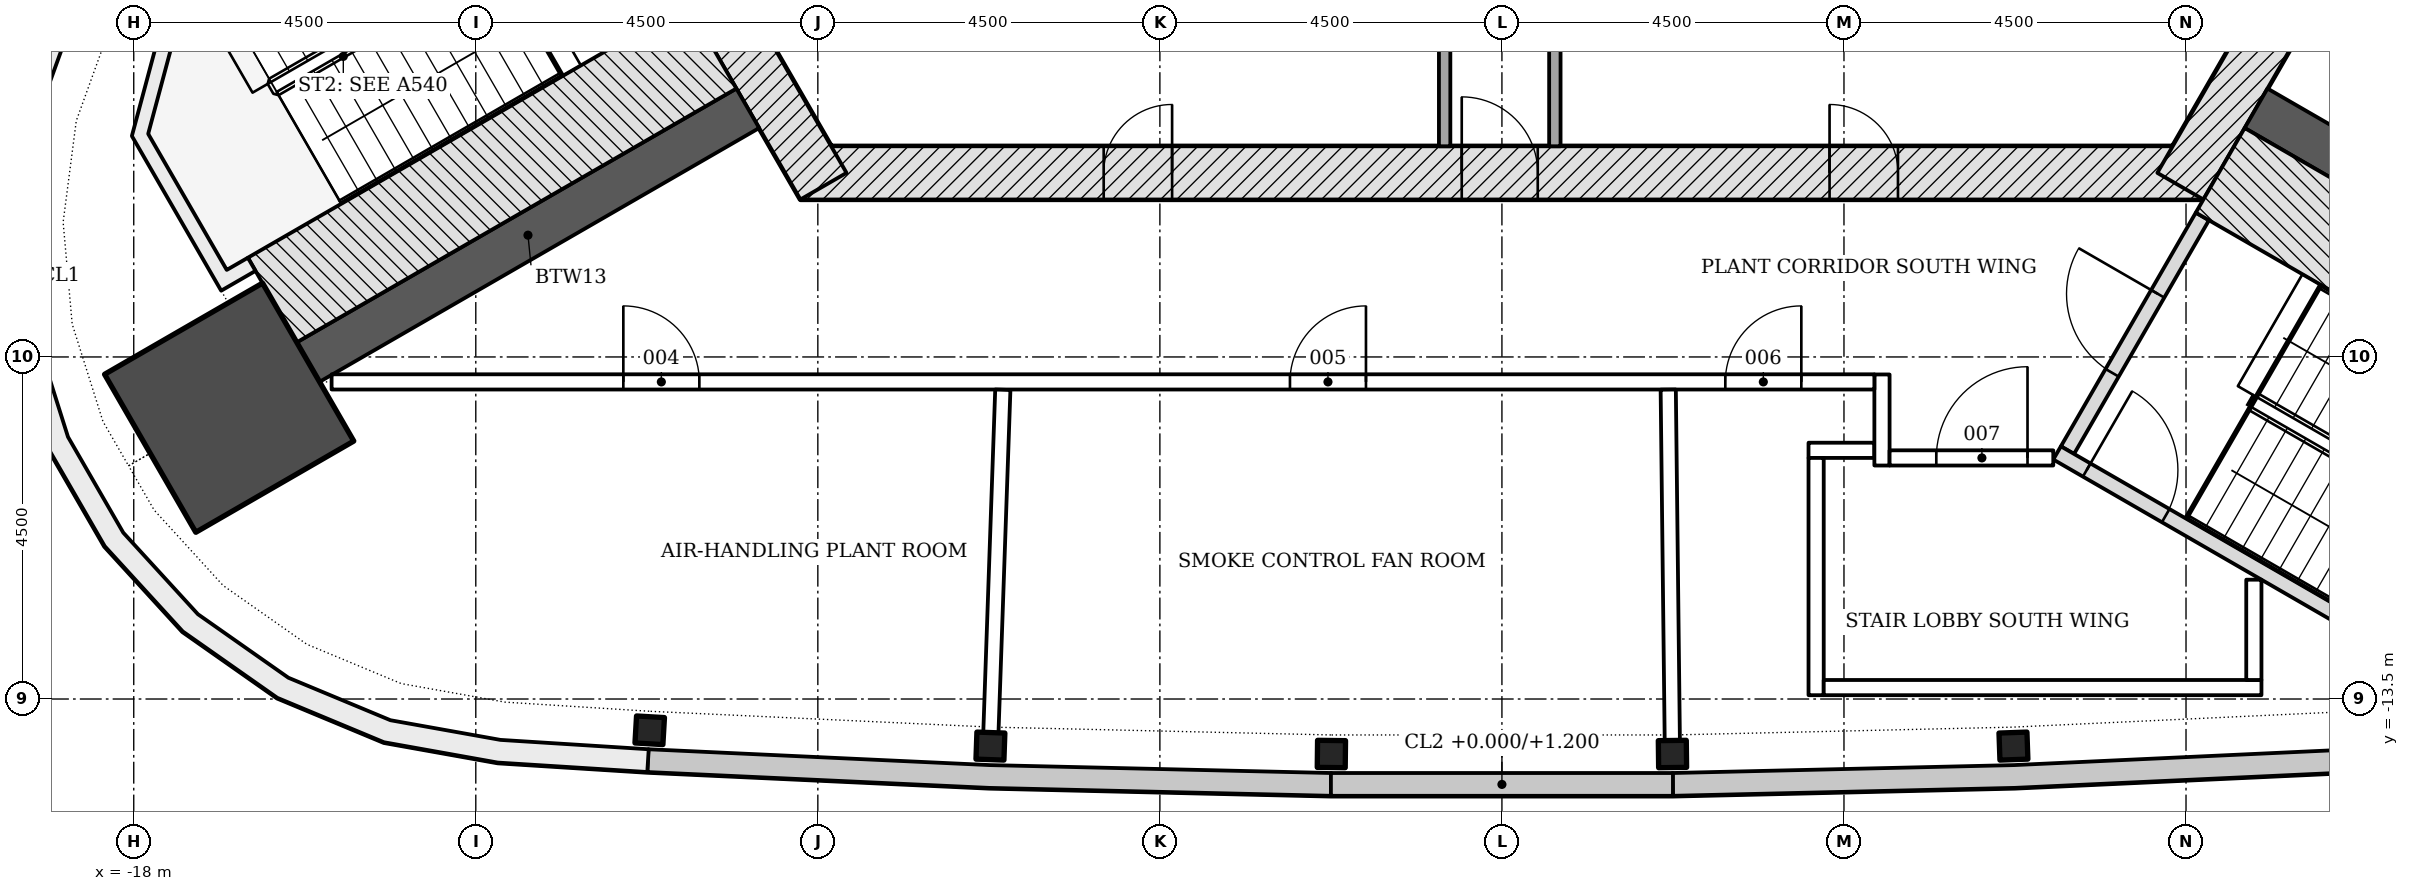
"""IFC4 building model, lengths in metres.
Left out: names, types, materials, properties, quantities, classifications, styles, units other than length and angle.
Written with IfcOpenShell. Run it as: python <this file> out.ifc"""

import sys

from ifc_helpers import new_model, si_unit, direction, frame, frame_2d, origin, origin_2d, place, context, subcontext, project, spatial, polyline, rectangle, i_section, outline, extrude, element, fill, save


model = new_model("IFC4")
c1 = context("Model", 3, precision=1e-05, world=origin(), true_north=direction((0.0, 1.0)))
c2 = subcontext(c1, "Body", "Model", "MODEL_VIEW")
j1 = project(units=[si_unit("LENGTHUNIT", "METRE"), si_unit("PLANEANGLEUNIT", "RADIAN")], contexts=[c1])
p1 = place(None, origin())
s1 = spatial("IfcSite", under=j1, at=p1, CompositionType="ELEMENT")
p2 = place(p1, origin())
s2 = spatial("IfcBuilding", under=s1, at=p2, CompositionType="ELEMENT")
p3 = place(p2, frame((0.0, 0.0, 288.6)))
s3 = spatial("IfcBuildingStorey", under=s2, at=p3, CompositionType="ELEMENT", Elevation=288.6)
p4 = place(p3, frame((-9.229, -6.578, -0.25), z_axis=(0.0, 0.0, 1.0), x_axis=(1.0, 0.0, 0.0)))
e1 = element("IfcWall", 1, at=p4, inside=s3, PredefinedType="SHEAR", context=c2, shape_type="SweptSolid", body=[
    extrude(rectangle(XDim=18.458, YDim=0.7, at=frame_2d((9.229, 0.0))), origin(), (0.0, 0.0, 1.0), 4.5),
])
p5 = place(p4, frame((8.7, 0.0, 0.25)))
e2 = element("IfcOpeningElement", 2, at=p5, cuts=e1, PredefinedType="OPENING", context=c2, shape_type="SweptSolid", body=[
    extrude(rectangle(XDim=1.0, YDim=2.1, at=frame_2d((0.5, 1.05))), frame((0.0, 0.36, 0.0), z_axis=(0.0, -1.0, 0.0), x_axis=(1.0, 0.0, 0.0)), (0.0, 0.0, 1.0), 0.72),
])
p6 = place(p4, frame((3.99, 0.0, 0.25)))
e3 = element("IfcOpeningElement", 3, at=p6, cuts=e1, PredefinedType="OPENING", context=c2, shape_type="SweptSolid", body=[
    extrude(rectangle(XDim=0.9, YDim=2.1, at=frame_2d((0.45, 1.05))), frame((0.0, 0.36, 0.0), z_axis=(0.0, -1.0, 0.0), x_axis=(1.0, 0.0, 0.0)), (0.0, 0.0, 1.0), 0.72),
])
p7 = place(p4, frame((13.539, 0.0, 0.25)))
e4 = element("IfcOpeningElement", 4, at=p7, cuts=e1, PredefinedType="OPENING", context=c2, shape_type="SweptSolid", body=[
    extrude(rectangle(XDim=0.9, YDim=2.1, at=frame_2d((0.45, 1.05))), frame((0.0, 0.36, 0.0), z_axis=(0.0, -1.0, 0.0), x_axis=(1.0, 0.0, 0.0)), (0.0, 0.0, 1.0), 0.72),
])
for number, where, z_axis, x_axis in (
    (5, (8.926, -6.753, -0.25), (0.0, 0.0, 1.0), (0.5, 0.866, 0.0)),
    (6, (-10.311, -4.353, -0.25), (0.0, 0.0, 1.0), (0.5, -0.866, 0.0)),
):
    element("IfcWall", number, at=place(p3, frame(where, z_axis=z_axis, x_axis=x_axis)), inside=s3, PredefinedType="SHEAR", context=c2, shape_type="SweptSolid", body=[
        extrude(rectangle(XDim=2.771, YDim=0.7, at=frame_2d((1.386, 0.0))), origin(), (0.0, 0.0, 1.0), 4.5),
    ])
for number, where, z_axis, x_axis in (
    (7, (-9.922, -5.728, -0.25), (0.0, 0.0, 1.0), (-0.866, -0.5, 0.0)),
    (8, (9.922, -5.728, -0.25), (0.0, 0.0, 1.0), (0.866, -0.5, 0.0)),
):
    element("IfcWall", number, at=place(p3, frame(where, z_axis=z_axis, x_axis=x_axis)), inside=s3, PredefinedType="SHEAR", context=c2, shape_type="SweptSolid", body=[
        extrude(rectangle(XDim=6.678, YDim=0.6, at=frame_2d((3.339, 0.0))), origin(), (0.0, 0.0, 1.0), 4.5),
    ])
p8 = place(p3, frame((-16.745, -9.667, -0.25), z_axis=(0.0, 0.0, 1.0), x_axis=(-0.866025403784, -0.5, 0.0)))
e9 = element("IfcColumn", 9, at=p8, inside=s3, PredefinedType="COLUMN", context=c2, shape_type="SweptSolid", body=[
    extrude(rectangle(XDim=2.4, YDim=2.4, at=origin_2d()), origin(), (0.0, 0.0, 1.0), 4.5),
])
for number, where, z_axis, x_axis in (
    (10, (-11.212, -13.911, -0.25), (0.0, 0.0, 1.0), (0.998, -0.058, 0.0)),
    (11, (-6.729, -14.119, -0.25), (0.0, 0.0, 1.0), (0.999, -0.035, 0.0)),
    (12, (-2.244, -14.224, -0.25), (0.0, 0.0, 1.0), (1.0, -0.012, 0.0)),
    (13, (2.244, -14.224, -0.25), (0.0, 0.0, 1.0), (1.0, 0.012, 0.0)),
    (14, (6.729, -14.119, -0.25), (0.0, 0.0, 1.0), (0.999, 0.035, 0.0)),
):
    element("IfcColumn", number, at=place(p3, frame(where, z_axis=z_axis, x_axis=x_axis)), inside=s3, PredefinedType="COLUMN", context=c2, shape_type="SweptSolid", body=[
        extrude(i_section(OverallWidth=0.368, OverallDepth=0.356, WebThickness=0.011, FlangeThickness=0.018, FilletRadius=0.015, at=origin_2d()), origin(), (0.0, 0.0, 1.0), 4.5),
    ])
p9 = place(p3, origin())
e15 = element("IfcWall", 15, at=p9, inside=s3, PredefinedType="NOTDEFINED", context=c2, shape_type="SweptSolid", body=[
    extrude(outline(polyline([(-11.244, -14.46), (-6.749, -14.669), (-2.25, -14.773), (-2.243, -14.474), (-6.738, -14.369), (-11.23, -14.161), (-11.244, -14.46)])), origin(), (0.0, 0.0, 1.0), 4.25),
])
p10 = place(p3, origin())
e16 = element("IfcWall", 16, at=p10, inside=s3, PredefinedType="NOTDEFINED", context=c2, shape_type="SweptSolid", body=[
    extrude(outline(polyline([(2.25, -14.773), (6.749, -14.669), (11.244, -14.46), (11.23, -14.161), (6.738, -14.369), (2.243, -14.474), (2.25, -14.773)])), origin(), (0.0, 0.0, 1.0), 4.25),
])
p11 = place(p3, origin())
e17 = element("IfcWall", 17, at=p11, inside=s3, PredefinedType="NOTDEFINED", context=c2, shape_type="SweptSolid", body=[
    extrude(outline(polyline([(-2.25, -14.773), (2.25, -14.773), (2.25, -14.473), (-2.25, -14.473), (-2.25, -14.773)])), origin(), (0.0, 0.0, 1.0), 1.2),
])
p12 = place(p3, origin())
e18 = element("IfcWall", 18, at=p12, inside=s3, PredefinedType="NOTDEFINED", context=c2, shape_type="SweptSolid", body=[
    extrude(outline(polyline([(-18.145, -2.507), (-19.021, -4.273), (-19.538, -5.703), (-19.733, -7.21), (-19.599, -8.724), (-19.141, -10.174), (-18.381, -11.49), (-17.355, -12.611), (-16.111, -13.485), (-14.708, -14.069), (-13.211, -14.336), (-11.244, -14.46), (-11.225, -14.161), (-13.176, -14.038), (-14.623, -13.779), (-15.965, -13.22), (-17.156, -12.385), (-18.138, -11.312), (-18.865, -10.052), (-19.303, -8.665), (-19.432, -7.216), (-19.244, -5.774), (-18.745, -4.391), (-17.876, -2.64), (-18.145, -2.507)])), origin(), (0.0, 0.0, 1.0), 4.25),
])
p13 = place(p3, frame((-0.754, 10.756, 0.0), z_axis=(0.0, 0.0, 1.0), x_axis=(0.0, -1.0, 0.0)))
e19 = element("IfcWall", 19, at=p13, inside=s3, PredefinedType="PARTITIONING", context=c2, shape_type="SweptSolid", body=[
    extrude(rectangle(XDim=16.985, YDim=0.15, at=frame_2d((8.492, 0.0))), origin(), (0.0, 0.0, 1.0), 4.25),
])
p14 = place(p13, frame((9.185, 0.0, 0.0)))
e20 = element("IfcOpeningElement", 20, at=p14, cuts=e19, PredefinedType="OPENING", context=c2, shape_type="SweptSolid", body=[
    extrude(rectangle(XDim=0.9, YDim=2.1, at=frame_2d((0.45, 1.05))), frame((0.0, 0.085, 0.0), z_axis=(0.0, -1.0, 0.0), x_axis=(1.0, 0.0, 0.0)), (0.0, 0.0, 1.0), 0.17),
])
p15 = place(p3, frame((0.696, 5.197, 0.0), z_axis=(0.0, 0.0, 1.0), x_axis=(0.0, -1.0, 0.0)))
e21 = element("IfcWall", 21, at=p15, inside=s3, PredefinedType="PARTITIONING", context=c2, shape_type="SweptSolid", body=[
    extrude(rectangle(XDim=11.425, YDim=0.15, at=frame_2d((5.712, 0.0))), origin(), (0.0, 0.0, 1.0), 4.25),
])
p16 = place(p15, frame((3.664, 0.0, 0.0)))
e22 = element("IfcOpeningElement", 22, at=p16, cuts=e21, PredefinedType="OPENING", context=c2, shape_type="SweptSolid", body=[
    extrude(rectangle(XDim=0.9, YDim=2.1, at=frame_2d((0.45, 1.05))), frame((0.0, 0.085, 0.0), z_axis=(0.0, -1.0, 0.0), x_axis=(1.0, 0.0, 0.0)), (0.0, 0.0, 1.0), 0.17),
])
p17 = place(p3, frame((-10.393, -4.912, -0.25), z_axis=(0.0, 0.0, 1.0), x_axis=(-0.866025486527, -0.499999856685, 0.0)))
e23 = element("IfcWall", 23, at=p17, inside=s3, PredefinedType="SHEAR", context=c2, shape_type="SweptSolid", body=[
    extrude(rectangle(XDim=6.679, YDim=1.286, at=frame_2d((3.339, 0.0))), origin(), (0.0, 0.0, 1.0), 4.5),
])
p18 = place(p3, frame((0.0, 0.0, -0.25)))
e24 = element("IfcWall", 24, at=p18, inside=s3, PredefinedType="SHEAR", context=c2, shape_type="SweptSolid", body=[
    extrude(outline(polyline([(-17.439, -3.907), (-18.025, -6.093), (-16.85, -8.128), (-16.398, -7.867), (-16.498, -7.694), (-16.498, -7.694), (-16.777, -7.855), (-17.81, -6.065), (-17.267, -4.039), (-17.339, -4.081), (-17.339, -4.081), (-17.339, -4.081), (-17.339, -4.081), (-17.339, -4.081), (-17.339, -4.081), (-17.339, -4.081), (-17.339, -4.081), (-17.339, -4.081), (-17.339, -4.081), (-17.339, -4.081), (-17.339, -4.081), (-17.339, -4.081), (-17.339, -4.081), (-17.339, -4.081), (-17.339, -4.081), (-17.339, -4.081), (-17.439, -3.907)])), origin(), (0.0, 0.0, 1.0), 4.5),
])
p19 = place(p3, frame((7.44, -10.226, -0.25), z_axis=(0.0, 0.0, 1.0), x_axis=(0.500022077904, 0.866012656725, 0.0)))
e25 = element("IfcWall", 25, at=p19, inside=s3, PredefinedType="SHEAR", context=c2, shape_type="SweptSolid", body=[
    extrude(rectangle(XDim=3.55, YDim=0.2, at=frame_2d((1.775, 0.0))), origin(), (0.0, 0.0, 1.0), 4.5),
])
p20 = place(p19, frame((1.175, 0.0, 0.25)))
e26 = element("IfcOpeningElement", 26, at=p20, cuts=e25, PredefinedType="OPENING", context=c2, shape_type="SweptSolid", body=[
    extrude(rectangle(XDim=1.2, YDim=2.1, at=frame_2d((0.6, 1.05))), frame((0.0, 0.11, 0.0), z_axis=(0.0, -1.0, 0.0), x_axis=(1.0, 0.0, 0.0)), (0.0, 0.0, 1.0), 0.22),
])
p21 = place(p3, frame((7.304, -10.262, -0.25), z_axis=(0.0, 0.0, 1.0), x_axis=(0.866026594901, -0.49999793692, 0.0)))
e27 = element("IfcWall", 27, at=p21, inside=s3, PredefinedType="SHEAR", context=c2, shape_type="SweptSolid", body=[
    extrude(rectangle(XDim=5.6, YDim=0.2, at=frame_2d((2.8, 0.0))), origin(), (0.0, 0.0, 1.0), 4.5),
])
p22 = place(p21, frame((0.45, 0.0, 0.25)))
e28 = element("IfcOpeningElement", 28, at=p22, cuts=e27, PredefinedType="OPENING", context=c2, shape_type="SweptSolid", body=[
    extrude(rectangle(XDim=1.2, YDim=2.1, at=frame_2d((0.6, 1.05))), frame((0.0, 0.11, 0.0), z_axis=(0.0, -1.0, 0.0), x_axis=(1.0, 0.0, 0.0)), (0.0, 0.0, 1.0), 0.22),
])
p23 = place(p3, frame((9.45, -6.545, -0.25), z_axis=(0.0, 0.0, 1.0), x_axis=(0.866016347338, -0.500015685897, 0.0)))
e29 = element("IfcWall", 29, at=p23, inside=s3, PredefinedType="SHEAR", context=c2, shape_type="SweptSolid", body=[
    extrude(rectangle(XDim=6.678, YDim=1.286, at=frame_2d((3.339, 0.0))), origin(), (0.0, 0.0, 1.0), 4.5),
])
p24 = place(p3, frame((4.034, -10.228, 0.0), z_axis=(0.0, 0.0, 1.0), x_axis=(1.0, 0.0, 0.0)))
e30 = element("IfcWall", 30, at=p24, inside=s3, PredefinedType="PARTITIONING", context=c2, shape_type="SweptSolid", body=[
    extrude(rectangle(XDim=0.866, YDim=0.2, at=frame_2d((0.433, 0.0))), origin(), (0.0, 0.0, 1.0), 4.25),
])
p25 = place(p3, frame((5.0, -10.428, 0.0), z_axis=(0.0, 0.0, 1.0), x_axis=(0.0, 1.0, 0.0)))
e31 = element("IfcWall", 31, at=p25, inside=s3, PredefinedType="PARTITIONING", context=c2, shape_type="SweptSolid", body=[
    extrude(rectangle(XDim=1.198, YDim=0.2, at=frame_2d((0.599, 0.0))), origin(), (0.0, 0.0, 1.0), 4.25),
])
p26 = place(p3, frame((5.1, -10.328, 0.0), z_axis=(0.0, 0.0, 1.0), x_axis=(1.0, 0.0, 0.0)))
e32 = element("IfcWall", 32, at=p26, inside=s3, PredefinedType="PARTITIONING", context=c2, shape_type="SweptSolid", body=[
    extrude(rectangle(XDim=2.154, YDim=0.2, at=frame_2d((1.077, 0.0))), origin(), (0.0, 0.0, 1.0), 3.702),
])
p27 = place(p26, frame((0.615, 0.0, 0.0)))
e33 = element("IfcOpeningElement", 33, at=p27, cuts=e32, PredefinedType="OPENING", context=c2, shape_type="SweptSolid", body=[
    extrude(rectangle(XDim=1.2, YDim=2.1, at=frame_2d((0.6, 1.05))), frame((0.0, 0.11, 0.0), z_axis=(0.0, -1.0, 0.0), x_axis=(1.0, 0.0, 0.0)), (0.0, 0.0, 1.0), 0.22),
])
p28 = place(p3, frame((-15.397, -9.328, 0.0), z_axis=(0.0, 0.0, 1.0), x_axis=(1.0, 0.0, 0.0)))
e34 = element("IfcWall", 34, at=p28, inside=s3, PredefinedType="PARTITIONING", context=c2, shape_type="SweptSolid", body=[
    extrude(rectangle(XDim=20.297, YDim=0.2, at=frame_2d((10.148, 0.0))), origin(), (0.0, 0.0, 1.0), 3.702),
])
p29 = place(p28, frame((3.838, 0.0, 0.0)))
e35 = element("IfcOpeningElement", 35, at=p29, cuts=e34, PredefinedType="OPENING", context=c2, shape_type="SweptSolid", body=[
    extrude(rectangle(XDim=1.0, YDim=2.1, at=frame_2d((0.5, 1.05))), frame((0.0, 0.11, 0.0), z_axis=(0.0, -1.0, 0.0), x_axis=(1.0, 0.0, 0.0)), (0.0, 0.0, 1.0), 0.22),
])
p30 = place(p28, frame((12.608, 0.0, 0.0)))
e36 = element("IfcOpeningElement", 36, at=p30, cuts=e34, PredefinedType="OPENING", context=c2, shape_type="SweptSolid", body=[
    extrude(rectangle(XDim=1.0, YDim=2.1, at=frame_2d((0.5, 1.05))), frame((0.0, 0.11, 0.0), z_axis=(0.0, -1.0, 0.0), x_axis=(1.0, 0.0, 0.0)), (0.0, 0.0, 1.0), 0.22),
])
p31 = place(p28, frame((18.336, 0.0, 0.0)))
e37 = element("IfcOpeningElement", 37, at=p31, cuts=e34, PredefinedType="OPENING", context=c2, shape_type="SweptSolid", body=[
    extrude(rectangle(XDim=1.0, YDim=2.1, at=frame_2d((0.5, 1.05))), frame((0.0, 0.11, 0.0), z_axis=(0.0, -1.0, 0.0), x_axis=(1.0, 0.0, 0.0)), (0.0, 0.0, 1.0), 0.22),
])
p32 = place(p3, frame((-6.724, -13.969, 0.0), z_axis=(0.0, 0.0, 1.0), x_axis=(0.034788205496, 0.999394707189, 0.0)))
e38 = element("IfcWall", 38, at=p32, inside=s3, PredefinedType="PARTITIONING", context=c2, shape_type="SweptSolid", body=[
    extrude(rectangle(XDim=4.541, YDim=0.2, at=frame_2d((2.27, 0.0))), origin(), (0.0, 0.0, 1.0), 3.702),
])
p33 = place(p3, frame((2.188, -9.429, 0.0), z_axis=(0.0, 0.0, 1.0), x_axis=(0.011564782234, -0.99993312567, 0.0)))
e39 = element("IfcWall", 39, at=p33, inside=s3, PredefinedType="PARTITIONING", context=c2, shape_type="SweptSolid", body=[
    extrude(rectangle(XDim=4.644, YDim=0.2, at=frame_2d((2.322, 0.0))), origin(), (0.0, 0.0, 1.0), 3.702),
])
p34 = place(p3, frame((4.134, -10.328, 0.0), z_axis=(0.0, 0.0, 1.0), x_axis=(0.0, -1.0, 0.0)))
e40 = element("IfcWall", 40, at=p34, inside=s3, PredefinedType="PARTITIONING", context=c2, shape_type="SweptSolid", body=[
    extrude(rectangle(XDim=3.122, YDim=0.2, at=frame_2d((1.561, 0.0))), origin(), (0.0, 0.0, 1.0), 4.25),
])
p35 = place(p3, frame((4.234, -13.35, 0.0), z_axis=(0.0, 0.0, 1.0), x_axis=(1.0, 0.0, 0.0)))
e41 = element("IfcWall", 41, at=p35, inside=s3, PredefinedType="PARTITIONING", context=c2, shape_type="SweptSolid", body=[
    extrude(rectangle(XDim=5.759, YDim=0.2, at=frame_2d((2.879, 0.0))), origin(), (0.0, 0.0, 1.0), 3.702),
])
p36 = place(p3, frame((9.893, -13.25, 0.0), z_axis=(0.0, 0.0, 1.0), x_axis=(0.0, 1.0, 0.0)))
e42 = element("IfcWall", 42, at=p36, inside=s3, PredefinedType="PARTITIONING", context=c2, shape_type="SweptSolid", body=[
    extrude(rectangle(XDim=1.32, YDim=0.2, at=frame_2d((0.66, 0.0))), origin(), (0.0, 0.0, 1.0), 4.25),
])
p37 = place(p3, frame((5.282, 8.708, 0.0), z_axis=(0.0, 0.0, 1.0), x_axis=(0.500001848211, -0.866024336717, 0.0)))
e43 = element("IfcWall", 43, at=p37, inside=s3, PredefinedType="PARTITIONING", context=c2, shape_type="SweptSolid", body=[
    extrude(rectangle(XDim=19.591, YDim=0.2, at=frame_2d((9.795, 0.0))), origin(), (0.0, 0.0, 1.0), 3.702),
])
p38 = place(p37, frame((12.923, 0.0, 0.0)))
e44 = element("IfcOpeningElement", 44, at=p38, cuts=e43, PredefinedType="OPENING", context=c2, shape_type="SweptSolid", body=[
    extrude(rectangle(XDim=1.0, YDim=2.1, at=frame_2d((0.5, 1.05))), frame((0.0, 0.11, 0.0), z_axis=(0.0, -1.0, 0.0), x_axis=(1.0, 0.0, 0.0)), (0.0, 0.0, 1.0), 0.22),
])
p39 = place(p37, frame((4.502, 0.0, 0.0)))
e45 = element("IfcOpeningElement", 45, at=p39, cuts=e43, PredefinedType="OPENING", context=c2, shape_type="SweptSolid", body=[
    extrude(rectangle(XDim=1.0, YDim=2.1, at=frame_2d((0.5, 1.05))), frame((0.0, 0.11, 0.0), z_axis=(0.0, -1.0, 0.0), x_axis=(1.0, 0.0, 0.0)), (0.0, 0.0, 1.0), 0.22),
])
p40 = place(p37, frame((0.965, 0.0, 0.0)))
e46 = element("IfcOpeningElement", 46, at=p40, cuts=e43, PredefinedType="OPENING", context=c2, shape_type="SweptSolid", body=[
    extrude(rectangle(XDim=1.0, YDim=2.1, at=frame_2d((0.5, 1.05))), frame((0.0, 0.11, 0.0), z_axis=(0.0, -1.0, 0.0), x_axis=(1.0, 0.0, 0.0)), (0.0, 0.0, 1.0), 0.22),
])
p41 = place(p5, origin())
e47 = element("IfcDoor", 47, at=p41, inside=s3, OperationType="SINGLE_SWING_LEFT", PredefinedType="DOOR", context=c2, shape_type="SweptSolid", body=[
    extrude(rectangle(XDim=1.0, YDim=2.1, at=frame_2d((0.5, 1.05))), frame((0.0, 0.075, 0.0), z_axis=(0.0, -1.0, 0.0), x_axis=(1.0, 0.0, 0.0)), (0.0, 0.0, 1.0), 0.15),
])
fill(e2, e47)
p42 = place(p6, origin())
e48 = element("IfcDoor", 48, at=p42, inside=s3, OperationType="SINGLE_SWING_RIGHT", PredefinedType="DOOR", context=c2, shape_type="SweptSolid", body=[
    extrude(rectangle(XDim=0.9, YDim=2.1, at=frame_2d((0.45, 1.05))), frame((0.0, 0.075, 0.0), z_axis=(0.0, -1.0, 0.0), x_axis=(1.0, 0.0, 0.0)), (0.0, 0.0, 1.0), 0.15),
])
fill(e3, e48)
p43 = place(p7, origin())
e49 = element("IfcDoor", 49, at=p43, inside=s3, OperationType="SINGLE_SWING_LEFT", PredefinedType="DOOR", context=c2, shape_type="SweptSolid", body=[
    extrude(rectangle(XDim=0.9, YDim=2.1, at=frame_2d((0.45, 1.05))), frame((0.0, 0.075, 0.0), z_axis=(0.0, -1.0, 0.0), x_axis=(1.0, 0.0, 0.0)), (0.0, 0.0, 1.0), 0.15),
])
fill(e4, e49)
p44 = place(p20, origin())
e50 = element("IfcDoor", 50, at=p44, inside=s3, OperationType="SINGLE_SWING_RIGHT", PredefinedType="DOOR", context=c2, shape_type="SweptSolid", body=[
    extrude(rectangle(XDim=1.2, YDim=2.1, at=frame_2d((0.6, 1.05))), frame((0.0, 0.025, 0.0), z_axis=(0.0, -1.0, 0.0), x_axis=(1.0, 0.0, 0.0)), (0.0, 0.0, 1.0), 0.05),
])
fill(e26, e50)
p45 = place(p22, origin())
e51 = element("IfcDoor", 51, at=p45, inside=s3, OperationType="SINGLE_SWING_LEFT", PredefinedType="DOOR", context=c2, shape_type="SweptSolid", body=[
    extrude(rectangle(XDim=1.2, YDim=2.1, at=frame_2d((0.6, 1.05))), frame((0.0, 0.025, 0.0), z_axis=(0.0, -1.0, 0.0), x_axis=(1.0, 0.0, 0.0)), (0.0, 0.0, 1.0), 0.05),
])
fill(e28, e51)
p46 = place(p29, origin())
e52 = element("IfcDoor", 52, at=p46, inside=s3, OperationType="SINGLE_SWING_LEFT", PredefinedType="DOOR", context=c2, shape_type="SweptSolid", body=[
    extrude(rectangle(XDim=1.0, YDim=2.1, at=frame_2d((0.5, 1.05))), frame((0.0, 0.025, 0.0), z_axis=(0.0, -1.0, 0.0), x_axis=(1.0, 0.0, 0.0)), (0.0, 0.0, 1.0), 0.05),
])
fill(e35, e52)
p47 = place(p30, origin())
e53 = element("IfcDoor", 53, at=p47, inside=s3, OperationType="SINGLE_SWING_RIGHT", PredefinedType="DOOR", context=c2, shape_type="SweptSolid", body=[
    extrude(rectangle(XDim=1.0, YDim=2.1, at=frame_2d((0.5, 1.05))), frame((0.0, 0.025, 0.0), z_axis=(0.0, -1.0, 0.0), x_axis=(1.0, 0.0, 0.0)), (0.0, 0.0, 1.0), 0.05),
])
fill(e36, e53)
p48 = place(p31, origin())
e54 = element("IfcDoor", 54, at=p48, inside=s3, OperationType="SINGLE_SWING_RIGHT", PredefinedType="DOOR", context=c2, shape_type="SweptSolid", body=[
    extrude(rectangle(XDim=1.0, YDim=2.1, at=frame_2d((0.5, 1.05))), frame((0.0, 0.025, 0.0), z_axis=(0.0, -1.0, 0.0), x_axis=(1.0, 0.0, 0.0)), (0.0, 0.0, 1.0), 0.05),
])
fill(e37, e54)
p49 = place(p27, origin())
e55 = element("IfcDoor", 55, at=p49, inside=s3, OperationType="SINGLE_SWING_RIGHT", PredefinedType="DOOR", context=c2, shape_type="SweptSolid", body=[
    extrude(rectangle(XDim=1.2, YDim=2.1, at=frame_2d((0.6, 1.05))), frame((0.0, 0.025, 0.0), z_axis=(0.0, -1.0, 0.0), x_axis=(1.0, 0.0, 0.0)), (0.0, 0.0, 1.0), 0.05),
])
fill(e33, e55)
save(model, sys.argv[1])
